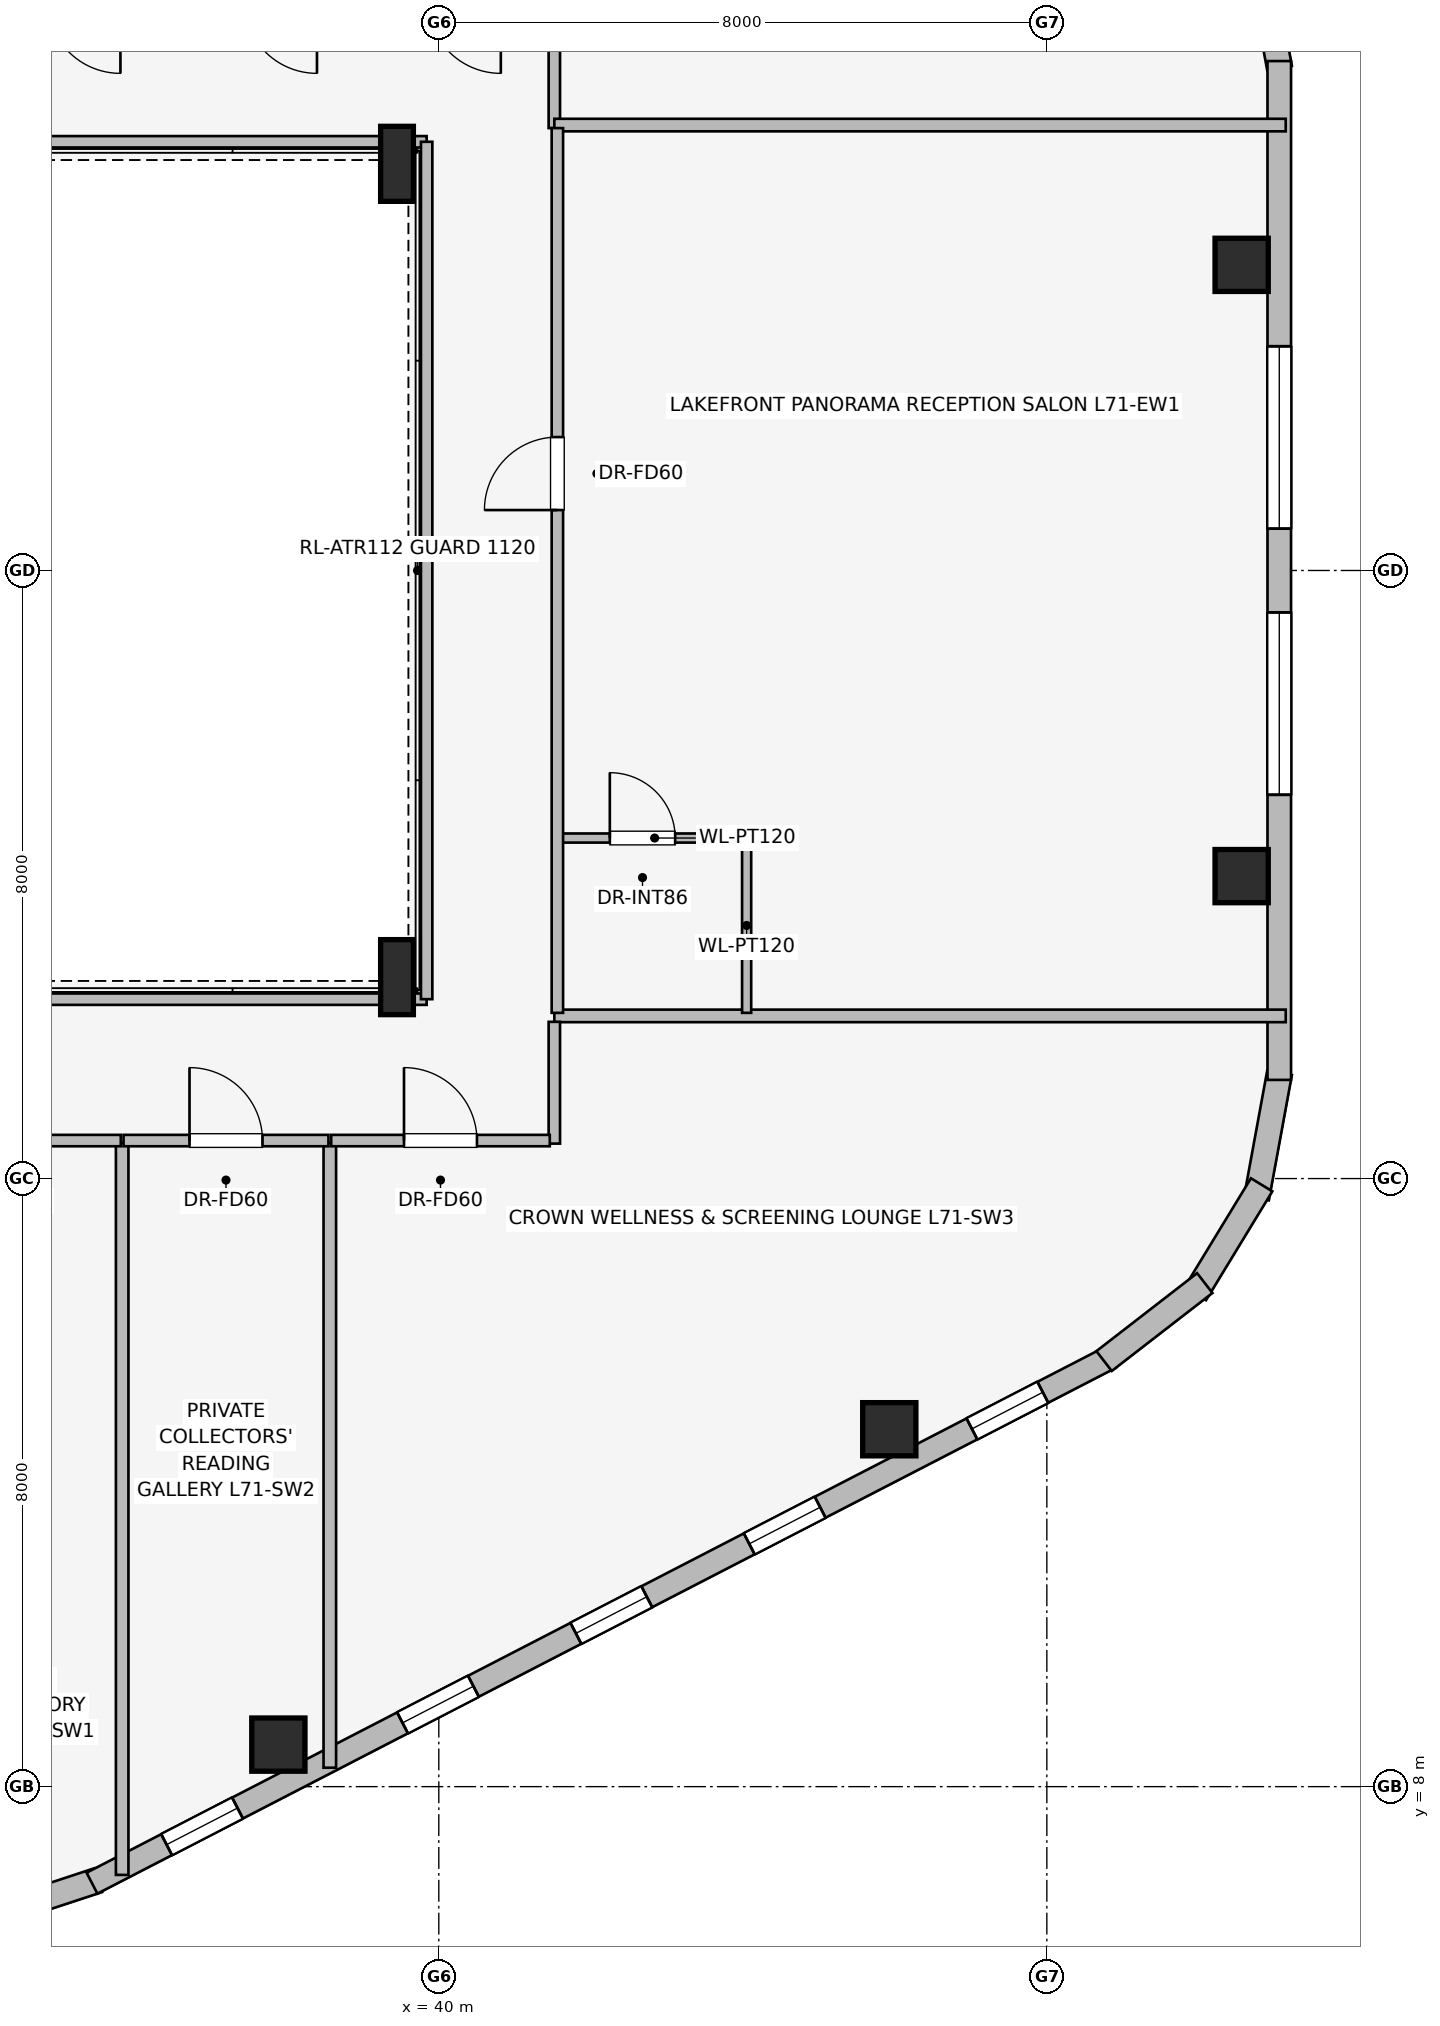
"""IFC4 building model, lengths in metres.
Left out: names, types, materials, properties, quantities, classifications, styles, units other than length and angle.
Written with IfcOpenShell. Run it as: python <this file> out.ifc"""

import sys

from ifc_helpers import new_model, si_unit, direction, frame, frame_2d, origin, origin_2d, place, context, subcontext, project, spatial, rectangle, i_section, extrude, element, fill, save


model = new_model("IFC4")
c1 = context("Model", 3, precision=1e-05, world=origin(), true_north=direction((0.0, 1.0)))
c2 = subcontext(c1, "Body", "Model", "MODEL_VIEW")
j1 = project(units=[si_unit("LENGTHUNIT", "METRE"), si_unit("PLANEANGLEUNIT", "RADIAN")], contexts=[c1])
p1 = place(None, origin())
s1 = spatial("IfcSite", under=j1, at=p1, CompositionType="ELEMENT")
p2 = place(p1, origin())
s2 = spatial("IfcBuilding", under=s1, at=p2, CompositionType="ELEMENT")
p3 = place(p2, frame((0.0, 0.0, 259.65)))
s3 = spatial("IfcBuildingStorey", under=s2, at=p3, CompositionType="ELEMENT", Elevation=259.65)
for number, where, z_axis, x_axis in (
    (1, (37.889, 8.553, 0.0), (0.0, 0.0, 1.0), (1.0, 0.0, 0.0)),
    (2, (45.927, 12.702, 0.0), (0.0, 0.0, 1.0), (1.0, 0.0, 0.0)),
    (3, (50.563, 19.979, 0.0), (0.0, 0.0, 1.0), (1.0, 0.0, 0.0)),
    (4, (50.563, 28.021, 0.0), (0.0, 0.0, 1.0), (1.0, 0.0, 0.0)),
):
    element("IfcColumn", number, at=place(p3, frame(where, z_axis=z_axis, x_axis=x_axis)), inside=s3, PredefinedType="COLUMN", context=c2, shape_type="SweptSolid", body=[
        extrude(rectangle(XDim=0.7, YDim=0.7, at=origin_2d()), origin(), (0.0, 0.0, 1.0), 3.55),
    ])
for number, where, z_axis, x_axis in (
    (5, (39.45, 18.65, 0.0), (0.0, 0.0, 1.0), (1.0, 0.0, 0.0)),
    (6, (39.45, 29.35, 0.0), (0.0, 0.0, 1.0), (1.0, 0.0, 0.0)),
):
    element("IfcColumn", number, at=place(p3, frame(where, z_axis=z_axis, x_axis=x_axis)), inside=s3, PredefinedType="COLUMN", context=c2, shape_type="SweptSolid", body=[
        extrude(i_section(OverallWidth=0.431, OverallDepth=0.987, WebThickness=0.034, FlangeThickness=0.062, at=origin_2d()), origin(), (0.0, 0.0, 1.0), 3.55),
    ])
p4 = place(p3, frame((50.759, 32.257, 0.0), z_axis=(0.0, 0.0, 1.0), x_axis=(0.180691763044, -0.983539773862, 0.0)))
e7 = element("IfcWall", 7, at=p4, inside=s3, PredefinedType="STANDARD", context=c2, shape_type="SweptSolid", body=[
    extrude(rectangle(XDim=1.677, YDim=0.33, at=frame_2d((0.838, 0.0))), origin(), (0.0, 0.0, 1.0), 3.29),
])
p5 = place(p3, frame((35.518, 6.769, 0.0), z_axis=(0.0, 0.0, 1.0), x_axis=(-0.949713440491, -0.313120393699, 0.0)))
e8 = element("IfcWall", 8, at=p5, inside=s3, PredefinedType="STANDARD", context=c2, shape_type="SweptSolid", body=[
    extrude(rectangle(XDim=1.722, YDim=0.33, at=frame_2d((0.861, 0.0))), origin(), (0.0, 0.0, 1.0), 3.29),
])
p6 = place(p3, frame((48.834, 13.646, 0.0), z_axis=(0.0, 0.0, 1.0), x_axis=(-0.888581481622, -0.458718814218, 0.0)))
e9 = element("IfcWall", 9, at=p6, inside=s3, PredefinedType="STANDARD", context=c2, shape_type="SweptSolid", body=[
    extrude(rectangle(XDim=15.077, YDim=0.31, at=frame_2d((7.539, 0.0))), origin(), (0.0, 0.0, 1.0), 3.29),
])
p7 = place(p6, frame((0.998, 0.0, 0.75)))
e10 = element("IfcOpeningElement", 10, at=p7, cuts=e9, PredefinedType="OPENING", context=c2, shape_type="SweptSolid", body=[
    extrude(rectangle(XDim=1.05, YDim=1.4, at=frame_2d((0.525, 0.7))), frame((0.0, 0.165, 0.0), z_axis=(0.0, -1.0, 0.0), x_axis=(1.0, 0.0, 0.0)), (0.0, 0.0, 1.0), 0.33),
])
p8 = place(p6, frame((4.295, 0.0, 0.75)))
e11 = element("IfcOpeningElement", 11, at=p8, cuts=e9, PredefinedType="OPENING", context=c2, shape_type="SweptSolid", body=[
    extrude(rectangle(XDim=1.05, YDim=1.4, at=frame_2d((0.525, 0.7))), frame((0.0, 0.165, 0.0), z_axis=(0.0, -1.0, 0.0), x_axis=(1.0, 0.0, 0.0)), (0.0, 0.0, 1.0), 0.33),
])
p9 = place(p6, frame((6.862, 0.0, 0.75)))
e12 = element("IfcOpeningElement", 12, at=p9, cuts=e9, PredefinedType="OPENING", context=c2, shape_type="SweptSolid", body=[
    extrude(rectangle(XDim=1.05, YDim=1.4, at=frame_2d((0.525, 0.7))), frame((0.0, 0.165, 0.0), z_axis=(0.0, -1.0, 0.0), x_axis=(1.0, 0.0, 0.0)), (0.0, 0.0, 1.0), 0.33),
])
p10 = place(p6, frame((9.429, 0.0, 0.75)))
e13 = element("IfcOpeningElement", 13, at=p10, cuts=e9, PredefinedType="OPENING", context=c2, shape_type="SweptSolid", body=[
    extrude(rectangle(XDim=1.05, YDim=1.4, at=frame_2d((0.525, 0.7))), frame((0.0, 0.165, 0.0), z_axis=(0.0, -1.0, 0.0), x_axis=(1.0, 0.0, 0.0)), (0.0, 0.0, 1.0), 0.33),
])
p11 = place(p6, frame((12.922, 0.0, 0.75)))
e14 = element("IfcOpeningElement", 14, at=p11, cuts=e9, PredefinedType="OPENING", context=c2, shape_type="SweptSolid", body=[
    extrude(rectangle(XDim=1.05, YDim=1.4, at=frame_2d((0.525, 0.7))), frame((0.0, 0.165, 0.0), z_axis=(0.0, -1.0, 0.0), x_axis=(1.0, 0.0, 0.0)), (0.0, 0.0, 1.0), 0.33),
])
p12 = place(p3, frame((51.062, 17.392, 0.0), z_axis=(0.0, 0.0, 1.0), x_axis=(-0.180691763044, -0.983539773862, 0.0)))
e15 = element("IfcWall", 15, at=p12, inside=s3, PredefinedType="STANDARD", context=c2, shape_type="SweptSolid", body=[
    extrude(rectangle(XDim=1.677, YDim=0.33, at=frame_2d((0.838, 0.0))), origin(), (0.0, 0.0, 1.0), 3.29),
])
p13 = place(p3, frame((50.826, 15.918, 0.0), z_axis=(0.0, 0.0, 1.0), x_axis=(-0.520325409202, -0.853968072318, 0.0)))
e16 = element("IfcWall", 16, at=p13, inside=s3, PredefinedType="STANDARD", context=c2, shape_type="SweptSolid", body=[
    extrude(rectangle(XDim=1.678, YDim=0.33, at=frame_2d((0.839, 0.0))), origin(), (0.0, 0.0, 1.0), 3.29),
])
p14 = place(p3, frame((50.078, 14.625, 0.0), z_axis=(0.0, 0.0, 1.0), x_axis=(-0.790691856293, -0.61221433207, 0.0)))
e17 = element("IfcWall", 17, at=p14, inside=s3, PredefinedType="STANDARD", context=c2, shape_type="SweptSolid", body=[
    extrude(rectangle(XDim=1.676, YDim=0.33, at=frame_2d((0.838, 0.0))), origin(), (0.0, 0.0, 1.0), 3.29),
])
p15 = place(p3, frame((51.058, 30.702, 0.0), z_axis=(0.0, 0.0, 1.0), x_axis=(0.0, -1.0, 0.0)))
e18 = element("IfcWall", 18, at=p15, inside=s3, PredefinedType="STANDARD", context=c2, shape_type="SweptSolid", body=[
    extrude(rectangle(XDim=13.404, YDim=0.31, at=frame_2d((6.702, 0.0))), origin(), (0.0, 0.0, 1.0), 3.29),
])
p16 = place(p15, frame((3.752, 0.0, 0.75)))
e19 = element("IfcOpeningElement", 19, at=p16, cuts=e18, PredefinedType="OPENING", context=c2, shape_type="SweptSolid", body=[
    extrude(rectangle(XDim=2.4, YDim=1.6, at=frame_2d((1.2, 0.8))), frame((0.0, 0.165, 0.0), z_axis=(0.0, -1.0, 0.0), x_axis=(1.0, 0.0, 0.0)), (0.0, 0.0, 1.0), 0.33),
])
p17 = place(p15, frame((7.253, 0.0, 0.75)))
e20 = element("IfcOpeningElement", 20, at=p17, cuts=e18, PredefinedType="OPENING", context=c2, shape_type="SweptSolid", body=[
    extrude(rectangle(XDim=2.4, YDim=1.6, at=frame_2d((1.2, 0.8))), frame((0.0, 0.165, 0.0), z_axis=(0.0, -1.0, 0.0), x_axis=(1.0, 0.0, 0.0)), (0.0, 0.0, 1.0), 0.33),
])
p18 = place(p3, frame((27.675, 18.36, 0.0), z_axis=(0.0, 0.0, 1.0), x_axis=(1.0, 0.0, 0.0)))
e21 = element("IfcWall", 21, at=p18, inside=s3, PredefinedType="PARTITIONING", context=c2, shape_type="SweptSolid", body=[
    extrude(rectangle(XDim=12.165, YDim=0.15, at=frame_2d((6.083, 0.0))), origin(), (0.0, 0.0, 1.0), 2.431),
])
p19 = place(p3, frame((39.84, 29.64, 0.0), z_axis=(0.0, 0.0, 1.0), x_axis=(-1.0, 0.0, 0.0)))
e22 = element("IfcWall", 22, at=p19, inside=s3, PredefinedType="PARTITIONING", context=c2, shape_type="SweptSolid", body=[
    extrude(rectangle(XDim=12.203, YDim=0.15, at=frame_2d((6.102, 0.0))), origin(), (0.0, 0.0, 1.0), 2.431),
])
p20 = place(p3, frame((39.84, 18.36, 0.0), z_axis=(0.0, 0.0, 1.0), x_axis=(0.0, 1.0, 0.0)))
e23 = element("IfcWall", 23, at=p20, inside=s3, PredefinedType="PARTITIONING", context=c2, shape_type="SweptSolid", body=[
    extrude(rectangle(XDim=11.28, YDim=0.15, at=frame_2d((5.64, 0.0))), origin(), (0.0, 0.0, 1.0), 3.29),
])
p21 = place(p3, frame((41.52, 29.82, 0.0), z_axis=(0.0, 0.0, 1.0), x_axis=(0.0, 1.0, 0.0)))
e24 = element("IfcWall", 24, at=p21, inside=s3, PredefinedType="PARTITIONING", context=c2, shape_type="SweptSolid", body=[
    extrude(rectangle(XDim=1.72, YDim=0.15, at=frame_2d((0.86, 0.0))), origin(), (0.0, 0.0, 1.0), 3.29),
])
for number, where, z_axis, x_axis in (
    (25, (41.52, 18.14, 0.0), (0.0, 0.0, 1.0), (1.0, 0.0, 0.0)),
    (26, (41.52, 29.86, 0.0), (0.0, 0.0, 1.0), (1.0, 0.0, 0.0)),
):
    element("IfcWall", number, at=place(p3, frame(where, z_axis=z_axis, x_axis=x_axis)), inside=s3, PredefinedType="PARTITIONING", context=c2, shape_type="SweptSolid", body=[
        extrude(rectangle(XDim=9.623, YDim=0.165, at=frame_2d((4.812, 0.0))), origin(), (0.0, 0.0, 1.0), 3.29),
    ])
p22 = place(p3, frame((41.6, 20.48, 0.0), z_axis=(0.0, 0.0, 1.0), x_axis=(1.0, 0.0, 0.0)))
e27 = element("IfcWall", 27, at=p22, inside=s3, PredefinedType="PARTITIONING", context=c2, shape_type="SweptSolid", body=[
    extrude(rectangle(XDim=2.48, YDim=0.12, at=frame_2d((1.24, 0.0))), origin(), (0.0, 0.0, 1.0), 3.29),
])
p23 = place(p22, frame((0.65, 0.0, 0.0)))
e28 = element("IfcOpeningElement", 28, at=p23, cuts=e27, PredefinedType="OPENING", context=c2, shape_type="SweptSolid", body=[
    extrude(rectangle(XDim=0.86, YDim=2.0, at=frame_2d((0.43, 1.0))), frame((0.0, 0.07, 0.0), z_axis=(0.0, -1.0, 0.0), x_axis=(1.0, 0.0, 0.0)), (0.0, 0.0, 1.0), 0.14),
])
p24 = place(p3, frame((44.05, 18.18, 0.0), z_axis=(0.0, 0.0, 1.0), x_axis=(0.0, 1.0, 0.0)))
e29 = element("IfcWall", 29, at=p24, inside=s3, PredefinedType="PARTITIONING", context=c2, shape_type="SweptSolid", body=[
    extrude(rectangle(XDim=2.3, YDim=0.12, at=frame_2d((1.15, 0.0))), origin(), (0.0, 0.0, 1.0), 2.887),
])
p25 = place(p3, frame((41.56, 18.18, 0.0), z_axis=(0.0, 0.0, 1.0), x_axis=(0.0, 1.0, 0.0)))
e30 = element("IfcWall", 30, at=p25, inside=s3, PredefinedType="PARTITIONING", context=c2, shape_type="SweptSolid", body=[
    extrude(rectangle(XDim=11.64, YDim=0.15, at=frame_2d((5.82, 0.0))), origin(), (0.0, 0.0, 1.0), 3.29),
])
p26 = place(p25, frame((6.615, 0.0, 0.0)))
e31 = element("IfcOpeningElement", 31, at=p26, cuts=e30, PredefinedType="OPENING", context=c2, shape_type="SweptSolid", body=[
    extrude(rectangle(XDim=0.96, YDim=2.0, at=frame_2d((0.48, 1.0))), frame((0.0, 0.085, 0.0), z_axis=(0.0, -1.0, 0.0), x_axis=(1.0, 0.0, 0.0)), (0.0, 0.0, 1.0), 0.17),
])
p27 = place(p3, frame((41.52, 16.46, 0.0), z_axis=(0.0, 0.0, 1.0), x_axis=(0.0, 1.0, 0.0)))
e32 = element("IfcWall", 32, at=p27, inside=s3, PredefinedType="PARTITIONING", context=c2, shape_type="SweptSolid", body=[
    extrude(rectangle(XDim=1.602, YDim=0.15, at=frame_2d((0.801, 0.0))), origin(), (0.0, 0.0, 1.0), 3.29),
])
p28 = place(p3, frame((35.834, 6.839, 0.0), z_axis=(0.0, 0.0, 1.0), x_axis=(0.0, 1.0, 0.0)))
e33 = element("IfcWall", 33, at=p28, inside=s3, PredefinedType="PARTITIONING", context=c2, shape_type="SweptSolid", body=[
    extrude(rectangle(XDim=9.631, YDim=0.165, at=frame_2d((4.815, 0.0))), origin(), (0.0, 0.0, 1.0), 3.29),
])
p29 = place(p3, frame((38.566, 8.249, 0.0), z_axis=(0.0, 0.0, 1.0), x_axis=(0.0, 1.0, 0.0)))
e34 = element("IfcWall", 34, at=p29, inside=s3, PredefinedType="PARTITIONING", context=c2, shape_type="SweptSolid", body=[
    extrude(rectangle(XDim=8.221, YDim=0.165, at=frame_2d((4.11, 0.0))), origin(), (0.0, 0.0, 1.0), 2.679),
])
p30 = place(p3, frame((32.85, 16.5, 0.0), z_axis=(0.0, 0.0, 1.0), x_axis=(1.0, 0.0, 0.0)))
e35 = element("IfcWall", 35, at=p30, inside=s3, PredefinedType="PARTITIONING", context=c2, shape_type="SweptSolid", body=[
    extrude(rectangle(XDim=2.966, YDim=0.15, at=frame_2d((1.483, 0.0))), origin(), (0.0, 0.0, 1.0), 3.29),
])
p31 = place(p30, frame((1.003, 0.0, 0.0)))
e36 = element("IfcOpeningElement", 36, at=p31, cuts=e35, PredefinedType="OPENING", context=c2, shape_type="SweptSolid", body=[
    extrude(rectangle(XDim=0.96, YDim=2.0, at=frame_2d((0.48, 1.0))), frame((0.0, 0.085, 0.0), z_axis=(0.0, -1.0, 0.0), x_axis=(1.0, 0.0, 0.0)), (0.0, 0.0, 1.0), 0.17),
])
p32 = place(p3, frame((35.852, 16.5, 0.0), z_axis=(0.0, 0.0, 1.0), x_axis=(1.0, 0.0, 0.0)))
e37 = element("IfcWall", 37, at=p32, inside=s3, PredefinedType="PARTITIONING", context=c2, shape_type="SweptSolid", body=[
    extrude(rectangle(XDim=2.696, YDim=0.15, at=frame_2d((1.348, 0.0))), origin(), (0.0, 0.0, 1.0), 3.29),
])
p33 = place(p32, frame((0.868, 0.0, 0.0)))
e38 = element("IfcOpeningElement", 38, at=p33, cuts=e37, PredefinedType="OPENING", context=c2, shape_type="SweptSolid", body=[
    extrude(rectangle(XDim=0.96, YDim=2.0, at=frame_2d((0.48, 1.0))), frame((0.0, 0.085, 0.0), z_axis=(0.0, -1.0, 0.0), x_axis=(1.0, 0.0, 0.0)), (0.0, 0.0, 1.0), 0.17),
])
p34 = place(p3, frame((38.584, 16.5, 0.0), z_axis=(0.0, 0.0, 1.0), x_axis=(1.0, 0.0, 0.0)))
e39 = element("IfcWall", 39, at=p34, inside=s3, PredefinedType="PARTITIONING", context=c2, shape_type="SweptSolid", body=[
    extrude(rectangle(XDim=2.876, YDim=0.15, at=frame_2d((1.438, 0.0))), origin(), (0.0, 0.0, 1.0), 3.29),
])
p35 = place(p34, frame((0.958, 0.0, 0.0)))
e40 = element("IfcOpeningElement", 40, at=p35, cuts=e39, PredefinedType="OPENING", context=c2, shape_type="SweptSolid", body=[
    extrude(rectangle(XDim=0.96, YDim=2.0, at=frame_2d((0.48, 1.0))), frame((0.0, 0.085, 0.0), z_axis=(0.0, -1.0, 0.0), x_axis=(1.0, 0.0, 0.0)), (0.0, 0.0, 1.0), 0.17),
])
p36 = place(p7, origin())
e41 = element("IfcWindow", 41, at=p36, inside=s3, PartitioningType="SINGLE_PANEL", PredefinedType="WINDOW", context=c2, shape_type="SweptSolid", body=[
    extrude(rectangle(XDim=1.05, YDim=1.4, at=frame_2d((0.525, 0.7))), frame((0.0, 0.03, 0.0), z_axis=(0.0, -1.0, 0.0), x_axis=(1.0, 0.0, 0.0)), (0.0, 0.0, 1.0), 0.06),
])
fill(e10, e41)
p37 = place(p8, origin())
e42 = element("IfcWindow", 42, at=p37, inside=s3, PartitioningType="SINGLE_PANEL", PredefinedType="WINDOW", context=c2, shape_type="SweptSolid", body=[
    extrude(rectangle(XDim=1.05, YDim=1.4, at=frame_2d((0.525, 0.7))), frame((0.0, 0.03, 0.0), z_axis=(0.0, -1.0, 0.0), x_axis=(1.0, 0.0, 0.0)), (0.0, 0.0, 1.0), 0.06),
])
fill(e11, e42)
p38 = place(p9, origin())
e43 = element("IfcWindow", 43, at=p38, inside=s3, PartitioningType="SINGLE_PANEL", PredefinedType="WINDOW", context=c2, shape_type="SweptSolid", body=[
    extrude(rectangle(XDim=1.05, YDim=1.4, at=frame_2d((0.525, 0.7))), frame((0.0, 0.03, 0.0), z_axis=(0.0, -1.0, 0.0), x_axis=(1.0, 0.0, 0.0)), (0.0, 0.0, 1.0), 0.06),
])
fill(e12, e43)
p39 = place(p10, origin())
e44 = element("IfcWindow", 44, at=p39, inside=s3, PartitioningType="SINGLE_PANEL", PredefinedType="WINDOW", context=c2, shape_type="SweptSolid", body=[
    extrude(rectangle(XDim=1.05, YDim=1.4, at=frame_2d((0.525, 0.7))), frame((0.0, 0.03, 0.0), z_axis=(0.0, -1.0, 0.0), x_axis=(1.0, 0.0, 0.0)), (0.0, 0.0, 1.0), 0.06),
])
fill(e13, e44)
p40 = place(p11, origin())
e45 = element("IfcWindow", 45, at=p40, inside=s3, PartitioningType="SINGLE_PANEL", PredefinedType="WINDOW", context=c2, shape_type="SweptSolid", body=[
    extrude(rectangle(XDim=1.05, YDim=1.4, at=frame_2d((0.525, 0.7))), frame((0.0, 0.03, 0.0), z_axis=(0.0, -1.0, 0.0), x_axis=(1.0, 0.0, 0.0)), (0.0, 0.0, 1.0), 0.06),
])
fill(e14, e45)
p41 = place(p16, origin())
e46 = element("IfcWindow", 46, at=p41, inside=s3, PartitioningType="SINGLE_PANEL", PredefinedType="WINDOW", context=c2, shape_type="SweptSolid", body=[
    extrude(rectangle(XDim=2.4, YDim=1.6, at=frame_2d((1.2, 0.8))), frame((0.0, 0.03, 0.0), z_axis=(0.0, -1.0, 0.0), x_axis=(1.0, 0.0, 0.0)), (0.0, 0.0, 1.0), 0.06),
])
fill(e19, e46)
p42 = place(p17, origin())
e47 = element("IfcWindow", 47, at=p42, inside=s3, PartitioningType="SINGLE_PANEL", PredefinedType="WINDOW", context=c2, shape_type="SweptSolid", body=[
    extrude(rectangle(XDim=2.4, YDim=1.6, at=frame_2d((1.2, 0.8))), frame((0.0, 0.03, 0.0), z_axis=(0.0, -1.0, 0.0), x_axis=(1.0, 0.0, 0.0)), (0.0, 0.0, 1.0), 0.06),
])
fill(e20, e47)
p43 = place(p23, origin())
e48 = element("IfcDoor", 48, at=p43, inside=s3, OperationType="SINGLE_SWING_LEFT", PredefinedType="DOOR", context=c2, shape_type="SweptSolid", body=[
    extrude(rectangle(XDim=0.86, YDim=2.0, at=frame_2d((0.43, 1.0))), frame((0.0, 0.025, 0.0), z_axis=(0.0, -1.0, 0.0), x_axis=(1.0, 0.0, 0.0)), (0.0, 0.0, 1.0), 0.05),
])
fill(e28, e48)
p44 = place(p26, origin())
e49 = element("IfcDoor", 49, at=p44, inside=s3, OperationType="SINGLE_SWING_LEFT", PredefinedType="DOOR", context=c2, shape_type="SweptSolid", body=[
    extrude(rectangle(XDim=0.96, YDim=2.0, at=frame_2d((0.48, 1.0))), frame((0.0, 0.025, 0.0), z_axis=(0.0, -1.0, 0.0), x_axis=(1.0, 0.0, 0.0)), (0.0, 0.0, 1.0), 0.05),
])
fill(e31, e49)
p45 = place(p33, origin())
e50 = element("IfcDoor", 50, at=p45, inside=s3, OperationType="SINGLE_SWING_LEFT", PredefinedType="DOOR", context=c2, shape_type="SweptSolid", body=[
    extrude(rectangle(XDim=0.96, YDim=2.0, at=frame_2d((0.48, 1.0))), frame((0.0, 0.025, 0.0), z_axis=(0.0, -1.0, 0.0), x_axis=(1.0, 0.0, 0.0)), (0.0, 0.0, 1.0), 0.05),
])
fill(e38, e50)
p46 = place(p35, origin())
e51 = element("IfcDoor", 51, at=p46, inside=s3, OperationType="SINGLE_SWING_LEFT", PredefinedType="DOOR", context=c2, shape_type="SweptSolid", body=[
    extrude(rectangle(XDim=0.96, YDim=2.0, at=frame_2d((0.48, 1.0))), frame((0.0, 0.025, 0.0), z_axis=(0.0, -1.0, 0.0), x_axis=(1.0, 0.0, 0.0)), (0.0, 0.0, 1.0), 0.05),
])
fill(e40, e51)
save(model, sys.argv[1])
